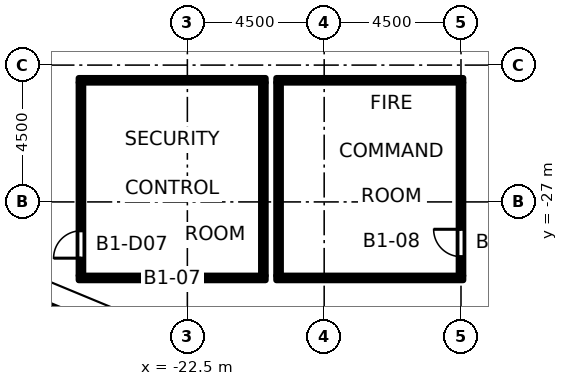
"""IFC4 building model, lengths in metres.
Left out: names, types, materials, properties, quantities, classifications, styles, units other than length and angle.
Written with IfcOpenShell. Run it as: python <this file> out.ifc"""

import sys

from ifc_helpers import new_model, si_unit, direction, frame, frame_2d, origin, place, context, subcontext, project, spatial, rectangle, extrude, element, fill, save


model = new_model("IFC4")
c1 = context("Model", 3, precision=1e-05, world=origin(), true_north=direction((0.0, 1.0)))
c2 = subcontext(c1, "Body", "Model", "MODEL_VIEW")
j1 = project(units=[si_unit("LENGTHUNIT", "METRE"), si_unit("PLANEANGLEUNIT", "RADIAN")], contexts=[c1])
p1 = place(None, origin())
s1 = spatial("IfcSite", under=j1, at=p1, CompositionType="ELEMENT")
p2 = place(p1, origin())
s2 = spatial("IfcBuilding", under=s1, at=p2, CompositionType="ELEMENT")
p3 = place(p2, frame((0.0, 0.0, -5.0)))
s3 = spatial("IfcBuildingStorey", under=s2, at=p3, CompositionType="ELEMENT", Elevation=-5.0)
p4 = place(p3, frame((-29.495, -29.631, -0.25), z_axis=(0.0, 0.0, 1.0), x_axis=(0.923879388078, -0.382683781057, 0.0)))
e1 = element("IfcWall", 1, at=p4, inside=s3, PredefinedType="SOLIDWALL", context=c2, shape_type="SweptSolid", body=[
    extrude(rectangle(XDim=7.318, YDim=0.5, at=frame_2d((3.659, 0.0))), origin(), (0.0, 0.0, 1.0), 5.1),
])
for number, where, z_axis, x_axis in (
    (2, (-26.075, -29.5, 0.0), (0.0, 0.0, 1.0), (1.0, 0.0, 0.0)),
    (3, (-19.575, -29.5, 0.0), (0.0, 0.0, 1.0), (1.0, 0.0, 0.0)),
    (4, (-26.075, -23.0, 0.0), (0.0, 0.0, 1.0), (1.0, 0.0, 0.0)),
    (5, (-19.575, -23.0, 0.0), (0.0, 0.0, 1.0), (1.0, 0.0, 0.0)),
):
    element("IfcWall", number, at=place(p3, frame(where, z_axis=z_axis, x_axis=x_axis)), inside=s3, PredefinedType="PARTITIONING", context=c2, shape_type="SweptSolid", body=[
        extrude(rectangle(XDim=6.15, YDim=0.15, at=frame_2d((3.075, 0.0))), origin(), (0.0, 0.0, 1.0), 4.55),
    ])
p5 = place(p3, frame((-26.0, -29.425, 0.0), z_axis=(0.0, 0.0, 1.0), x_axis=(0.0, 1.0, 0.0)))
e6 = element("IfcWall", 6, at=p5, inside=s3, PredefinedType="PARTITIONING", context=c2, shape_type="SweptSolid", body=[
    extrude(rectangle(XDim=6.35, YDim=0.15, at=frame_2d((3.175, 0.0))), origin(), (0.0, 0.0, 1.0), 4.55),
])
p6 = place(p5, frame((0.575, 0.0, 0.0)))
e7 = element("IfcOpeningElement", 7, at=p6, cuts=e6, PredefinedType="OPENING", context=c2, shape_type="SweptSolid", body=[
    extrude(rectangle(XDim=0.9, YDim=2.1, at=frame_2d((0.45, 1.05))), frame((0.0, 0.085, 0.0), z_axis=(0.0, -1.0, 0.0), x_axis=(1.0, 0.0, 0.0)), (0.0, 0.0, 1.0), 0.17),
])
for number, where, z_axis, x_axis in (
    (8, (-20.0, -29.425, 0.0), (0.0, 0.0, 1.0), (0.0, 1.0, 0.0)),
    (9, (-19.5, -29.425, 0.0), (0.0, 0.0, 1.0), (0.0, 1.0, 0.0)),
):
    element("IfcWall", number, at=place(p3, frame(where, z_axis=z_axis, x_axis=x_axis)), inside=s3, PredefinedType="PARTITIONING", context=c2, shape_type="SweptSolid", body=[
        extrude(rectangle(XDim=6.35, YDim=0.15, at=frame_2d((3.175, 0.0))), origin(), (0.0, 0.0, 1.0), 4.55),
    ])
p7 = place(p3, frame((-13.5, -29.425, 0.0), z_axis=(0.0, 0.0, 1.0), x_axis=(0.0, 1.0, 0.0)))
e10 = element("IfcWall", 10, at=p7, inside=s3, PredefinedType="PARTITIONING", context=c2, shape_type="SweptSolid", body=[
    extrude(rectangle(XDim=6.35, YDim=0.15, at=frame_2d((3.175, 0.0))), origin(), (0.0, 0.0, 1.0), 3.55),
])
p8 = place(p7, frame((0.625, 0.0, 0.0)))
e11 = element("IfcOpeningElement", 11, at=p8, cuts=e10, PredefinedType="OPENING", context=c2, shape_type="SweptSolid", body=[
    extrude(rectangle(XDim=0.9, YDim=2.1, at=frame_2d((0.45, 1.05))), frame((0.0, 0.085, 0.0), z_axis=(0.0, -1.0, 0.0), x_axis=(1.0, 0.0, 0.0)), (0.0, 0.0, 1.0), 0.17),
])
p9 = place(p6, origin())
e12 = element("IfcDoor", 12, at=p9, inside=s3, OperationType="SINGLE_SWING_LEFT", PredefinedType="DOOR", context=c2, shape_type="SweptSolid", body=[
    extrude(rectangle(XDim=0.9, YDim=2.1, at=frame_2d((0.45, 1.05))), frame((0.0, 0.025, 0.0), z_axis=(0.0, -1.0, 0.0), x_axis=(1.0, 0.0, 0.0)), (0.0, 0.0, 1.0), 0.05),
])
fill(e7, e12)
p10 = place(p8, origin())
e13 = element("IfcDoor", 13, at=p10, inside=s3, OperationType="SINGLE_SWING_RIGHT", PredefinedType="DOOR", context=c2, shape_type="SweptSolid", body=[
    extrude(rectangle(XDim=0.9, YDim=2.1, at=frame_2d((0.45, 1.05))), frame((0.0, 0.025, 0.0), z_axis=(0.0, -1.0, 0.0), x_axis=(1.0, 0.0, 0.0)), (0.0, 0.0, 1.0), 0.05),
])
fill(e11, e13)
save(model, sys.argv[1])
